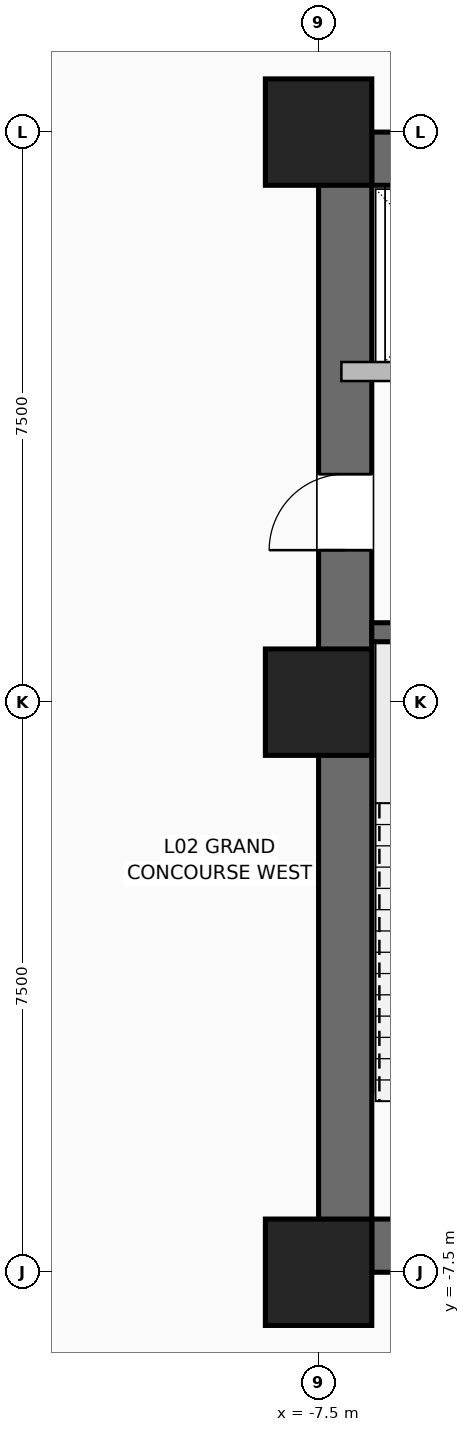
"""IFC4 building model, lengths in metres.
Left out: names, types, materials, properties, quantities, classifications, styles, units other than length and angle.
Written with IfcOpenShell. Run it as: python <this file> out.ifc"""

import sys

from ifc_helpers import new_model, si_unit, direction, frame, frame_2d, origin, origin_2d, place, context, subcontext, project, spatial, rectangle, hollow_rectangle, extrude, element, fill, save


model = new_model("IFC4")
c1 = context("Model", 3, precision=1e-05, world=origin(), true_north=direction((0.0, 1.0)))
c2 = subcontext(c1, "Body", "Model", "MODEL_VIEW")
j1 = project(units=[si_unit("LENGTHUNIT", "METRE"), si_unit("PLANEANGLEUNIT", "RADIAN")], contexts=[c1])
p1 = place(None, origin())
s1 = spatial("IfcSite", under=j1, at=p1, CompositionType="ELEMENT")
p2 = place(p1, origin())
s2 = spatial("IfcBuilding", under=s1, at=p2, CompositionType="ELEMENT")
p3 = place(p2, frame((0.0, 0.0, 10.8)))
s3 = spatial("IfcBuildingStorey", under=s2, at=p3, CompositionType="ELEMENT", Elevation=10.8)
for number, where, z_axis, x_axis in (
    (1, (-7.5, -7.5, 0.0), (0.0, 0.0, 1.0), (1.0, 0.0, 0.0)),
    (2, (-7.5, 7.5, 0.0), (0.0, 0.0, 1.0), (1.0, 0.0, 0.0)),
    (3, (-7.5, 0.0, 0.0), (0.0, 0.0, 1.0), (1.0, 0.0, 0.0)),
):
    element("IfcColumn", number, at=place(p3, frame(where, z_axis=z_axis, x_axis=x_axis)), inside=s3, PredefinedType="COLUMN", context=c2, shape_type="SweptSolid", body=[
        extrude(hollow_rectangle(XDim=1.4, YDim=1.4, WallThickness=0.06, at=origin_2d()), origin(), (0.0, 0.0, 1.0), 5.4),
    ])
p4 = place(p3, frame((-7.5, -7.15, 0.0), z_axis=(0.0, 0.0, 1.0), x_axis=(1.0, 0.0, 0.0)))
e4 = element("IfcWall", 4, at=p4, inside=s3, PredefinedType="SHEAR", context=c2, shape_type="SweptSolid", body=[
    extrude(rectangle(XDim=15.0, YDim=0.7, at=frame_2d((7.5, 0.0))), origin(), (0.0, 0.0, 1.0), 5.0),
])
p5 = place(p4, frame((1.55, 0.0, 0.0)))
e5 = element("IfcOpeningElement", 5, at=p5, cuts=e4, PredefinedType="OPENING", context=c2, shape_type="SweptSolid", body=[
    extrude(rectangle(XDim=1.05, YDim=2.08, at=frame_2d((0.525, 1.04))), frame((0.0, 0.36, 0.0), z_axis=(0.0, -1.0, 0.0), x_axis=(1.0, 0.0, 0.0)), (0.0, 0.0, 1.0), 0.72),
])
p6 = place(p4, frame((12.4, 0.0, 0.0)))
e6 = element("IfcOpeningElement", 6, at=p6, cuts=e4, PredefinedType="OPENING", context=c2, shape_type="SweptSolid", body=[
    extrude(rectangle(XDim=1.05, YDim=2.08, at=frame_2d((0.525, 1.04))), frame((0.0, 0.36, 0.0), z_axis=(0.0, -1.0, 0.0), x_axis=(1.0, 0.0, 0.0)), (0.0, 0.0, 1.0), 0.72),
])
p7 = place(p4, frame((4.64, 0.0, 0.0)))
e7 = element("IfcOpeningElement", 7, at=p7, cuts=e4, PredefinedType="OPENING", context=c2, shape_type="SweptSolid", body=[
    extrude(rectangle(XDim=1.1, YDim=2.2, at=frame_2d((0.55, 1.1))), frame((0.0, 0.36, 0.0), z_axis=(0.0, -1.0, 0.0), x_axis=(1.0, 0.0, 0.0)), (0.0, 0.0, 1.0), 0.72),
])
p8 = place(p4, frame((6.52, 0.0, 0.0)))
e8 = element("IfcOpeningElement", 8, at=p8, cuts=e4, PredefinedType="OPENING", context=c2, shape_type="SweptSolid", body=[
    extrude(rectangle(XDim=1.1, YDim=2.2, at=frame_2d((0.55, 1.1))), frame((0.0, 0.36, 0.0), z_axis=(0.0, -1.0, 0.0), x_axis=(1.0, 0.0, 0.0)), (0.0, 0.0, 1.0), 0.72),
])
p9 = place(p4, frame((8.4, 0.0, 0.0)))
e9 = element("IfcOpeningElement", 9, at=p9, cuts=e4, PredefinedType="OPENING", context=c2, shape_type="SweptSolid", body=[
    extrude(rectangle(XDim=1.1, YDim=2.2, at=frame_2d((0.55, 1.1))), frame((0.0, 0.36, 0.0), z_axis=(0.0, -1.0, 0.0), x_axis=(1.0, 0.0, 0.0)), (0.0, 0.0, 1.0), 0.72),
])
p10 = place(p3, frame((-7.5, 7.15, 0.0), z_axis=(0.0, 0.0, 1.0), x_axis=(1.0, 0.0, 0.0)))
e10 = element("IfcWall", 10, at=p10, inside=s3, PredefinedType="SHEAR", context=c2, shape_type="SweptSolid", body=[
    extrude(rectangle(XDim=15.0, YDim=0.7, at=frame_2d((7.5, 0.0))), origin(), (0.0, 0.0, 1.0), 5.0),
])
p11 = place(p3, frame((-7.15, -7.5, 0.0), z_axis=(0.0, 0.0, 1.0), x_axis=(0.0, 1.0, 0.0)))
e11 = element("IfcWall", 11, at=p11, inside=s3, PredefinedType="SHEAR", context=c2, shape_type="SweptSolid", body=[
    extrude(rectangle(XDim=15.0, YDim=0.7, at=frame_2d((7.5, 0.0))), origin(), (0.0, 0.0, 1.0), 5.0),
])
p12 = place(p11, frame((9.5, 0.0, 0.0)))
e12 = element("IfcOpeningElement", 12, at=p12, cuts=e11, PredefinedType="OPENING", context=c2, shape_type="SweptSolid", body=[
    extrude(rectangle(XDim=1.0, YDim=2.08, at=frame_2d((0.5, 1.04))), frame((0.0, 0.36, 0.0), z_axis=(0.0, -1.0, 0.0), x_axis=(1.0, 0.0, 0.0)), (0.0, 0.0, 1.0), 0.72),
])
p13 = place(p3, frame((-6.8, 0.92, 0.0), z_axis=(0.0, 0.0, 1.0), x_axis=(1.0, 0.0, 0.0)))
e13 = element("IfcWall", 13, at=p13, inside=s3, PredefinedType="SHEAR", context=c2, shape_type="SweptSolid", body=[
    extrude(rectangle(XDim=3.33, YDim=0.25, at=frame_2d((1.665, 0.0))), origin(), (0.0, 0.0, 1.0), 5.0),
])
p14 = place(p3, frame((-7.2, 4.35, 0.0), z_axis=(0.0, 0.0, 1.0), x_axis=(1.0, 0.0, 0.0)))
e14 = element("IfcWall", 14, at=p14, inside=s3, PredefinedType="SHEAR", context=c2, shape_type="SweptSolid", body=[
    extrude(rectangle(XDim=2.7, YDim=0.25, at=frame_2d((1.35, 0.0))), origin(), (0.0, 0.0, 1.0), 5.0),
])
p15 = place(p14, frame((0.75, 0.0, 0.0)))
e15 = element("IfcOpeningElement", 15, at=p15, cuts=e14, PredefinedType="OPENING", context=c2, shape_type="SweptSolid", body=[
    extrude(rectangle(XDim=1.2, YDim=2.2, at=frame_2d((0.6, 1.1))), frame((0.0, 0.135, 0.0), z_axis=(0.0, -1.0, 0.0), x_axis=(1.0, 0.0, 0.0)), (0.0, 0.0, 1.0), 0.27),
])
p16 = place(p12, origin())
e16 = element("IfcDoor", 16, at=p16, inside=s3, OperationType="SINGLE_SWING_LEFT", PredefinedType="DOOR", context=c2, shape_type="SweptSolid", body=[
    extrude(rectangle(XDim=1.0, YDim=2.08, at=frame_2d((0.5, 1.04))), frame((0.0, 0.025, 0.0), z_axis=(0.0, -1.0, 0.0), x_axis=(1.0, 0.0, 0.0)), (0.0, 0.0, 1.0), 0.05),
])
fill(e12, e16)
save(model, sys.argv[1])
